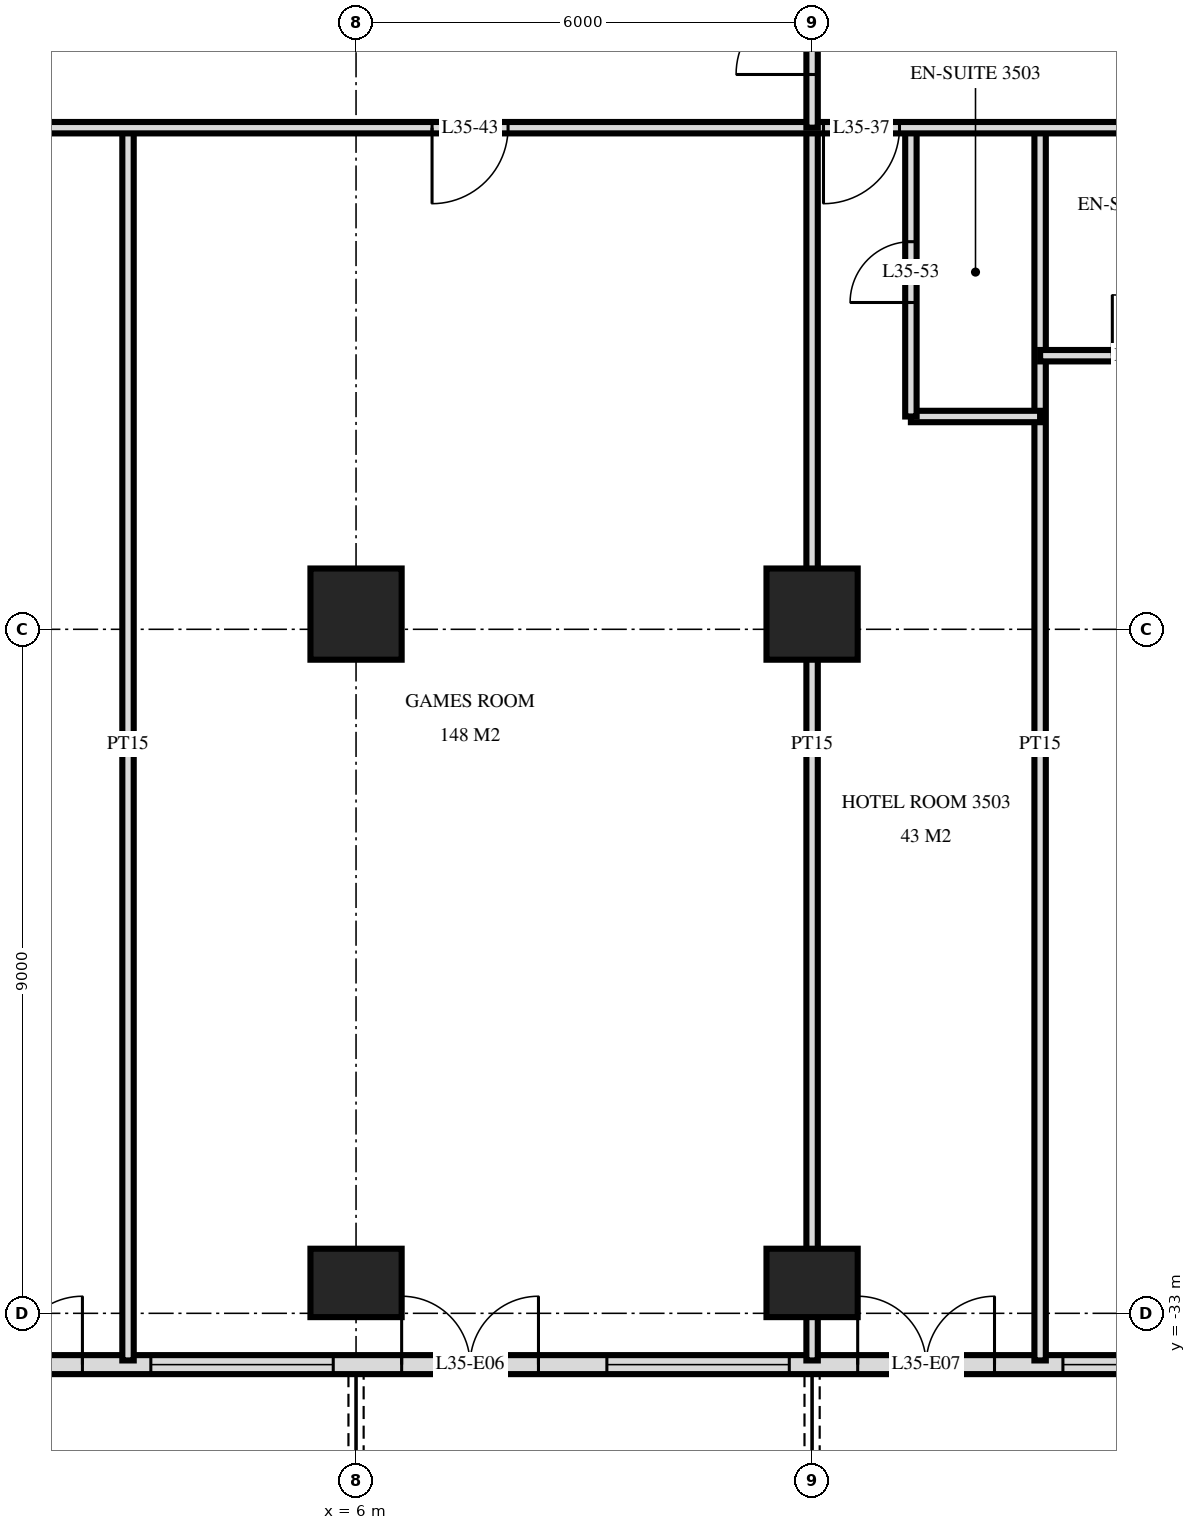
"""IFC4 building model, lengths in metres.
Left out: names, types, materials, properties, quantities, classifications, styles, units other than length and angle.
Written with IfcOpenShell. Run it as: python <this file> out.ifc"""

import sys

from ifc_helpers import new_model, si_unit, direction, frame, frame_2d, origin, origin_2d, place, context, subcontext, project, spatial, rectangle, extrude, element, fill, save


model = new_model("IFC4")
c1 = context("Model", 3, precision=1e-05, world=origin(), true_north=direction((0.0, 1.0)))
c2 = subcontext(c1, "Body", "Model", "MODEL_VIEW")
j1 = project(units=[si_unit("LENGTHUNIT", "METRE"), si_unit("PLANEANGLEUNIT", "RADIAN")], contexts=[c1])
p1 = place(None, origin())
s1 = spatial("IfcSite", under=j1, at=p1, CompositionType="ELEMENT")
p2 = place(p1, origin())
s2 = spatial("IfcBuilding", under=s1, at=p2, CompositionType="ELEMENT")
p3 = place(p2, frame((0.0, 0.0, 138.0)))
s3 = spatial("IfcBuildingStorey", under=s2, at=p3, CompositionType="ELEMENT", Elevation=138.0)
p4 = place(p3, frame((6.0, -32.6, 0.0), z_axis=(0.0, 0.0, 1.0), x_axis=(1.0, 0.0, 0.0)))
e1 = element("IfcColumn", 1, at=p4, inside=s3, PredefinedType="COLUMN", context=c2, shape_type="SweptSolid", body=[
    extrude(rectangle(XDim=1.2, YDim=0.9, at=origin_2d()), origin(), (0.0, 0.0, 1.0), 3.6),
])
p5 = place(p3, frame((6.0, -23.8, 0.0), z_axis=(0.0, 0.0, 1.0), x_axis=(1.0, 0.0, 0.0)))
e2 = element("IfcColumn", 2, at=p5, inside=s3, PredefinedType="COLUMN", context=c2, shape_type="SweptSolid", body=[
    extrude(rectangle(XDim=1.2, YDim=1.2, at=origin_2d()), origin(), (0.0, 0.0, 1.0), 3.6),
])
p6 = place(p3, frame((12.0, -32.6, 0.0), z_axis=(0.0, 0.0, 1.0), x_axis=(1.0, 0.0, 0.0)))
e3 = element("IfcColumn", 3, at=p6, inside=s3, PredefinedType="COLUMN", context=c2, shape_type="SweptSolid", body=[
    extrude(rectangle(XDim=1.2, YDim=0.9, at=origin_2d()), origin(), (0.0, 0.0, 1.0), 3.6),
])
p7 = place(p3, frame((12.0, -23.8, 0.0), z_axis=(0.0, 0.0, 1.0), x_axis=(1.0, 0.0, 0.0)))
e4 = element("IfcColumn", 4, at=p7, inside=s3, PredefinedType="COLUMN", context=c2, shape_type="SweptSolid", body=[
    extrude(rectangle(XDim=1.2, YDim=1.2, at=origin_2d()), origin(), (0.0, 0.0, 1.0), 3.6),
])
p8 = place(p3, frame((-23.675, -33.675, 0.0), z_axis=(0.0, 0.0, 1.0), x_axis=(1.0, 0.0, 0.0)))
e5 = element("IfcWall", 5, at=p8, inside=s3, PredefinedType="SOLIDWALL", context=c2, shape_type="SweptSolid", body=[
    extrude(rectangle(XDim=47.351, YDim=0.25, at=frame_2d((23.675, 0.0))), origin(), (0.0, 0.0, 1.0), 3.32),
])
p9 = place(p8, frame((0.575, 0.0, 0.0)))
e6 = element("IfcOpeningElement", 6, at=p9, cuts=e5, PredefinedType="OPENING", context=c2, shape_type="SweptSolid", body=[
    extrude(rectangle(XDim=1.8, YDim=2.4, at=frame_2d((0.9, 1.2))), frame((0.0, 0.135, 0.0), z_axis=(0.0, -1.0, 0.0), x_axis=(1.0, 0.0, 0.0)), (0.0, 0.0, 1.0), 0.27),
])
p10 = place(p8, frame((3.425, 0.0, 0.3)))
e7 = element("IfcOpeningElement", 7, at=p10, cuts=e5, PredefinedType="OPENING", context=c2, shape_type="SweptSolid", body=[
    extrude(rectangle(XDim=1.8, YDim=2.1, at=frame_2d((0.9, 1.05))), frame((0.0, 0.135, 0.0), z_axis=(0.0, -1.0, 0.0), x_axis=(1.0, 0.0, 0.0)), (0.0, 0.0, 1.0), 0.27),
])
p11 = place(p8, frame((5.975, 0.0, 0.3)))
e8 = element("IfcOpeningElement", 8, at=p11, cuts=e5, PredefinedType="OPENING", context=c2, shape_type="SweptSolid", body=[
    extrude(rectangle(XDim=2.4, YDim=2.1, at=frame_2d((1.2, 1.05))), frame((0.0, 0.135, 0.0), z_axis=(0.0, -1.0, 0.0), x_axis=(1.0, 0.0, 0.0)), (0.0, 0.0, 1.0), 0.27),
])
p12 = place(p8, frame((9.275, 0.0, 0.0)))
e9 = element("IfcOpeningElement", 9, at=p12, cuts=e5, PredefinedType="OPENING", context=c2, shape_type="SweptSolid", body=[
    extrude(rectangle(XDim=1.8, YDim=2.4, at=frame_2d((0.9, 1.2))), frame((0.0, 0.135, 0.0), z_axis=(0.0, -1.0, 0.0), x_axis=(1.0, 0.0, 0.0)), (0.0, 0.0, 1.0), 0.27),
])
p13 = place(p8, frame((12.275, 0.0, 0.0)))
e10 = element("IfcOpeningElement", 10, at=p13, cuts=e5, PredefinedType="OPENING", context=c2, shape_type="SweptSolid", body=[
    extrude(rectangle(XDim=1.8, YDim=2.4, at=frame_2d((0.9, 1.2))), frame((0.0, 0.135, 0.0), z_axis=(0.0, -1.0, 0.0), x_axis=(1.0, 0.0, 0.0)), (0.0, 0.0, 1.0), 0.27),
])
p14 = place(p8, frame((14.975, 0.0, 0.3)))
e11 = element("IfcOpeningElement", 11, at=p14, cuts=e5, PredefinedType="OPENING", context=c2, shape_type="SweptSolid", body=[
    extrude(rectangle(XDim=2.4, YDim=2.1, at=frame_2d((1.2, 1.05))), frame((0.0, 0.135, 0.0), z_axis=(0.0, -1.0, 0.0), x_axis=(1.0, 0.0, 0.0)), (0.0, 0.0, 1.0), 0.27),
])
p15 = place(p8, frame((17.975, 0.0, 0.3)))
e12 = element("IfcOpeningElement", 12, at=p15, cuts=e5, PredefinedType="OPENING", context=c2, shape_type="SweptSolid", body=[
    extrude(rectangle(XDim=2.4, YDim=2.1, at=frame_2d((1.2, 1.05))), frame((0.0, 0.135, 0.0), z_axis=(0.0, -1.0, 0.0), x_axis=(1.0, 0.0, 0.0)), (0.0, 0.0, 1.0), 0.27),
])
p16 = place(p8, frame((21.275, 0.0, 0.0)))
e13 = element("IfcOpeningElement", 13, at=p16, cuts=e5, PredefinedType="OPENING", context=c2, shape_type="SweptSolid", body=[
    extrude(rectangle(XDim=1.8, YDim=2.4, at=frame_2d((0.9, 1.2))), frame((0.0, 0.135, 0.0), z_axis=(0.0, -1.0, 0.0), x_axis=(1.0, 0.0, 0.0)), (0.0, 0.0, 1.0), 0.27),
])
p17 = place(p8, frame((24.275, 0.0, 0.0)))
e14 = element("IfcOpeningElement", 14, at=p17, cuts=e5, PredefinedType="OPENING", context=c2, shape_type="SweptSolid", body=[
    extrude(rectangle(XDim=1.8, YDim=2.4, at=frame_2d((0.9, 1.2))), frame((0.0, 0.135, 0.0), z_axis=(0.0, -1.0, 0.0), x_axis=(1.0, 0.0, 0.0)), (0.0, 0.0, 1.0), 0.27),
])
p18 = place(p8, frame((26.975, 0.0, 0.3)))
e15 = element("IfcOpeningElement", 15, at=p18, cuts=e5, PredefinedType="OPENING", context=c2, shape_type="SweptSolid", body=[
    extrude(rectangle(XDim=2.4, YDim=2.1, at=frame_2d((1.2, 1.05))), frame((0.0, 0.135, 0.0), z_axis=(0.0, -1.0, 0.0), x_axis=(1.0, 0.0, 0.0)), (0.0, 0.0, 1.0), 0.27),
])
p19 = place(p8, frame((30.275, 0.0, 0.0)))
e16 = element("IfcOpeningElement", 16, at=p19, cuts=e5, PredefinedType="OPENING", context=c2, shape_type="SweptSolid", body=[
    extrude(rectangle(XDim=1.8, YDim=2.4, at=frame_2d((0.9, 1.2))), frame((0.0, 0.135, 0.0), z_axis=(0.0, -1.0, 0.0), x_axis=(1.0, 0.0, 0.0)), (0.0, 0.0, 1.0), 0.27),
])
p20 = place(p8, frame((32.975, 0.0, 0.3)))
e17 = element("IfcOpeningElement", 17, at=p20, cuts=e5, PredefinedType="OPENING", context=c2, shape_type="SweptSolid", body=[
    extrude(rectangle(XDim=2.4, YDim=2.1, at=frame_2d((1.2, 1.05))), frame((0.0, 0.135, 0.0), z_axis=(0.0, -1.0, 0.0), x_axis=(1.0, 0.0, 0.0)), (0.0, 0.0, 1.0), 0.27),
])
p21 = place(p8, frame((36.275, 0.0, 0.0)))
e18 = element("IfcOpeningElement", 18, at=p21, cuts=e5, PredefinedType="OPENING", context=c2, shape_type="SweptSolid", body=[
    extrude(rectangle(XDim=1.8, YDim=2.4, at=frame_2d((0.9, 1.2))), frame((0.0, 0.135, 0.0), z_axis=(0.0, -1.0, 0.0), x_axis=(1.0, 0.0, 0.0)), (0.0, 0.0, 1.0), 0.27),
])
p22 = place(p8, frame((38.975, 0.0, 0.3)))
e19 = element("IfcOpeningElement", 19, at=p22, cuts=e5, PredefinedType="OPENING", context=c2, shape_type="SweptSolid", body=[
    extrude(rectangle(XDim=2.4, YDim=2.1, at=frame_2d((1.2, 1.05))), frame((0.0, 0.135, 0.0), z_axis=(0.0, -1.0, 0.0), x_axis=(1.0, 0.0, 0.0)), (0.0, 0.0, 1.0), 0.27),
])
p23 = place(p8, frame((42.275, 0.0, 0.0)))
e20 = element("IfcOpeningElement", 20, at=p23, cuts=e5, PredefinedType="OPENING", context=c2, shape_type="SweptSolid", body=[
    extrude(rectangle(XDim=1.8, YDim=2.4, at=frame_2d((0.9, 1.2))), frame((0.0, 0.135, 0.0), z_axis=(0.0, -1.0, 0.0), x_axis=(1.0, 0.0, 0.0)), (0.0, 0.0, 1.0), 0.27),
])
p24 = place(p8, frame((45.125, 0.0, 0.3)))
e21 = element("IfcOpeningElement", 21, at=p24, cuts=e5, PredefinedType="OPENING", context=c2, shape_type="SweptSolid", body=[
    extrude(rectangle(XDim=1.8, YDim=2.1, at=frame_2d((0.9, 1.05))), frame((0.0, 0.135, 0.0), z_axis=(0.0, -1.0, 0.0), x_axis=(1.0, 0.0, 0.0)), (0.0, 0.0, 1.0), 0.27),
])
p25 = place(p3, frame((15.0, -33.62, 0.0), z_axis=(0.0, 0.0, 1.0), x_axis=(0.0, 1.0, 0.0)))
e22 = element("IfcWall", 22, at=p25, inside=s3, PredefinedType="PARTITIONING", context=c2, shape_type="SweptSolid", body=[
    extrude(rectangle(XDim=16.22, YDim=0.15, at=frame_2d((8.11, 0.0))), origin(), (0.0, 0.0, 1.0), 3.32),
])
p26 = place(p3, frame((13.3, -21.2, 0.0), z_axis=(0.0, 0.0, 1.0), x_axis=(0.0, 1.0, 0.0)))
e23 = element("IfcWall", 23, at=p26, inside=s3, PredefinedType="PARTITIONING", context=c2, shape_type="SweptSolid", body=[
    extrude(rectangle(XDim=3.8, YDim=0.15, at=frame_2d((1.9, 0.0))), origin(), (0.0, 0.0, 1.0), 3.32),
])
p27 = place(p26, frame((1.5, 0.0, 0.0)))
e24 = element("IfcOpeningElement", 24, at=p27, cuts=e23, PredefinedType="OPENING", context=c2, shape_type="SweptSolid", body=[
    extrude(rectangle(XDim=0.8, YDim=2.1, at=frame_2d((0.4, 1.05))), frame((0.0, 0.085, 0.0), z_axis=(0.0, -1.0, 0.0), x_axis=(1.0, 0.0, 0.0)), (0.0, 0.0, 1.0), 0.17),
])
p28 = place(p3, frame((12.0, -17.4, 0.0), z_axis=(0.0, 0.0, 1.0), x_axis=(0.0, 1.0, 0.0)))
e25 = element("IfcWall", 25, at=p28, inside=s3, PredefinedType="PARTITIONING", context=c2, shape_type="SweptSolid", body=[
    extrude(rectangle(XDim=2.35, YDim=0.15, at=frame_2d((1.175, 0.0))), origin(), (0.0, 0.0, 1.0), 3.32),
])
p29 = place(p28, frame((0.7, 0.0, 0.0)))
e26 = element("IfcOpeningElement", 26, at=p29, cuts=e25, PredefinedType="OPENING", context=c2, shape_type="SweptSolid", body=[
    extrude(rectangle(XDim=1.0, YDim=2.1, at=frame_2d((0.5, 1.05))), frame((0.0, 0.085, 0.0), z_axis=(0.0, -1.0, 0.0), x_axis=(1.0, 0.0, 0.0)), (0.0, 0.0, 1.0), 0.17),
])
for number, where, z_axis, x_axis in (
    (27, (12.0, -33.62, 0.0), (0.0, 0.0, 1.0), (0.0, 1.0, 0.0)),
    (28, (3.0, -33.62, 0.0), (0.0, 0.0, 1.0), (0.0, 1.0, 0.0)),
):
    element("IfcWall", number, at=place(p3, frame(where, z_axis=z_axis, x_axis=x_axis)), inside=s3, PredefinedType="PARTITIONING", context=c2, shape_type="SweptSolid", body=[
        extrude(rectangle(XDim=16.22, YDim=0.15, at=frame_2d((8.11, 0.0))), origin(), (0.0, 0.0, 1.0), 3.32),
    ])
p30 = place(p3, frame((13.3, -21.2, 0.0), z_axis=(0.0, 0.0, 1.0), x_axis=(1.0, 0.0, 0.0)))
e29 = element("IfcWall", 29, at=p30, inside=s3, PredefinedType="PARTITIONING", context=c2, shape_type="SweptSolid", body=[
    extrude(rectangle(XDim=1.7, YDim=0.15, at=frame_2d((0.85, 0.0))), origin(), (0.0, 0.0, 1.0), 3.32),
])
p31 = place(p3, frame((15.0, -20.4, 0.0), z_axis=(0.0, 0.0, 1.0), x_axis=(1.0, 0.0, 0.0)))
e30 = element("IfcWall", 30, at=p31, inside=s3, PredefinedType="PARTITIONING", context=c2, shape_type="SweptSolid", body=[
    extrude(rectangle(XDim=4.2, YDim=0.15, at=frame_2d((2.1, 0.0))), origin(), (0.0, 0.0, 1.0), 3.32),
])
p32 = place(p31, frame((0.95, 0.0, 0.0)))
e31 = element("IfcOpeningElement", 31, at=p32, cuts=e30, PredefinedType="OPENING", context=c2, shape_type="SweptSolid", body=[
    extrude(rectangle(XDim=0.8, YDim=2.1, at=frame_2d((0.4, 1.05))), frame((0.0, 0.085, 0.0), z_axis=(0.0, -1.0, 0.0), x_axis=(1.0, 0.0, 0.0)), (0.0, 0.0, 1.0), 0.17),
])
p33 = place(p3, frame((-28.02, -17.4, 0.0), z_axis=(0.0, 0.0, 1.0), x_axis=(1.0, 0.0, 0.0)))
e32 = element("IfcWall", 32, at=p33, inside=s3, PredefinedType="PARTITIONING", context=c2, shape_type="SweptSolid", body=[
    extrude(rectangle(XDim=56.04, YDim=0.15, at=frame_2d((28.02, 0.0))), origin(), (0.0, 0.0, 1.0), 3.32),
])
p34 = place(p33, frame((13.17, 0.0, 0.0)))
e33 = element("IfcOpeningElement", 33, at=p34, cuts=e32, PredefinedType="OPENING", context=c2, shape_type="SweptSolid", body=[
    extrude(rectangle(XDim=1.0, YDim=2.1, at=frame_2d((0.5, 1.05))), frame((0.0, 0.085, 0.0), z_axis=(0.0, -1.0, 0.0), x_axis=(1.0, 0.0, 0.0)), (0.0, 0.0, 1.0), 0.17),
])
p35 = place(p33, frame((11.87, 0.0, 0.0)))
e34 = element("IfcOpeningElement", 34, at=p35, cuts=e32, PredefinedType="OPENING", context=c2, shape_type="SweptSolid", body=[
    extrude(rectangle(XDim=1.0, YDim=2.1, at=frame_2d((0.5, 1.05))), frame((0.0, 0.085, 0.0), z_axis=(0.0, -1.0, 0.0), x_axis=(1.0, 0.0, 0.0)), (0.0, 0.0, 1.0), 0.17),
])
p36 = place(p33, frame((2.32, 0.0, 0.0)))
e35 = element("IfcOpeningElement", 35, at=p36, cuts=e32, PredefinedType="OPENING", context=c2, shape_type="SweptSolid", body=[
    extrude(rectangle(XDim=1.0, YDim=2.1, at=frame_2d((0.5, 1.05))), frame((0.0, 0.085, 0.0), z_axis=(0.0, -1.0, 0.0), x_axis=(1.0, 0.0, 0.0)), (0.0, 0.0, 1.0), 0.17),
])
p37 = place(p33, frame((40.17, 0.0, 0.0)))
e36 = element("IfcOpeningElement", 36, at=p37, cuts=e32, PredefinedType="OPENING", context=c2, shape_type="SweptSolid", body=[
    extrude(rectangle(XDim=1.0, YDim=2.1, at=frame_2d((0.5, 1.05))), frame((0.0, 0.085, 0.0), z_axis=(0.0, -1.0, 0.0), x_axis=(1.0, 0.0, 0.0)), (0.0, 0.0, 1.0), 0.17),
])
p38 = place(p33, frame((51.22, 0.0, 0.0)))
e37 = element("IfcOpeningElement", 37, at=p38, cuts=e32, PredefinedType="OPENING", context=c2, shape_type="SweptSolid", body=[
    extrude(rectangle(XDim=1.0, YDim=2.1, at=frame_2d((0.5, 1.05))), frame((0.0, 0.085, 0.0), z_axis=(0.0, -1.0, 0.0), x_axis=(1.0, 0.0, 0.0)), (0.0, 0.0, 1.0), 0.17),
])
p39 = place(p33, frame((18.52, 0.0, 0.0)))
e38 = element("IfcOpeningElement", 38, at=p39, cuts=e32, PredefinedType="OPENING", context=c2, shape_type="SweptSolid", body=[
    extrude(rectangle(XDim=1.0, YDim=2.1, at=frame_2d((0.5, 1.05))), frame((0.0, 0.085, 0.0), z_axis=(0.0, -1.0, 0.0), x_axis=(1.0, 0.0, 0.0)), (0.0, 0.0, 1.0), 0.17),
])
p40 = place(p33, frame((26.02, 0.0, 0.0)))
e39 = element("IfcOpeningElement", 39, at=p40, cuts=e32, PredefinedType="OPENING", context=c2, shape_type="SweptSolid", body=[
    extrude(rectangle(XDim=1.0, YDim=2.1, at=frame_2d((0.5, 1.05))), frame((0.0, 0.085, 0.0), z_axis=(0.0, -1.0, 0.0), x_axis=(1.0, 0.0, 0.0)), (0.0, 0.0, 1.0), 0.17),
])
p41 = place(p33, frame((35.02, 0.0, 0.0)))
e40 = element("IfcOpeningElement", 40, at=p41, cuts=e32, PredefinedType="OPENING", context=c2, shape_type="SweptSolid", body=[
    extrude(rectangle(XDim=1.0, YDim=2.1, at=frame_2d((0.5, 1.05))), frame((0.0, 0.085, 0.0), z_axis=(0.0, -1.0, 0.0), x_axis=(1.0, 0.0, 0.0)), (0.0, 0.0, 1.0), 0.17),
])
p42 = place(p17, origin())
e41 = element("IfcDoor", 41, at=p42, inside=s3, OperationType="DOUBLE_DOOR_SINGLE_SWING", PredefinedType="DOOR", context=c2, shape_type="SweptSolid", body=[
    extrude(rectangle(XDim=1.8, YDim=2.4, at=frame_2d((0.9, 1.2))), frame((0.0, 0.025, 0.0), z_axis=(0.0, -1.0, 0.0), x_axis=(1.0, 0.0, 0.0)), (0.0, 0.0, 1.0), 0.05),
])
fill(e14, e41)
p43 = place(p18, origin())
e42 = element("IfcWindow", 42, at=p43, inside=s3, PartitioningType="SINGLE_PANEL", PredefinedType="WINDOW", context=c2, shape_type="SweptSolid", body=[
    extrude(rectangle(XDim=2.4, YDim=2.1, at=frame_2d((1.2, 1.05))), frame((0.0, 0.03, 0.0), z_axis=(0.0, -1.0, 0.0), x_axis=(1.0, 0.0, 0.0)), (0.0, 0.0, 1.0), 0.06),
])
fill(e15, e42)
p44 = place(p19, origin())
e43 = element("IfcDoor", 43, at=p44, inside=s3, OperationType="DOUBLE_DOOR_SINGLE_SWING", PredefinedType="DOOR", context=c2, shape_type="SweptSolid", body=[
    extrude(rectangle(XDim=1.8, YDim=2.4, at=frame_2d((0.9, 1.2))), frame((0.0, 0.025, 0.0), z_axis=(0.0, -1.0, 0.0), x_axis=(1.0, 0.0, 0.0)), (0.0, 0.0, 1.0), 0.05),
])
fill(e16, e43)
p45 = place(p20, origin())
e44 = element("IfcWindow", 44, at=p45, inside=s3, PartitioningType="SINGLE_PANEL", PredefinedType="WINDOW", context=c2, shape_type="SweptSolid", body=[
    extrude(rectangle(XDim=2.4, YDim=2.1, at=frame_2d((1.2, 1.05))), frame((0.0, 0.03, 0.0), z_axis=(0.0, -1.0, 0.0), x_axis=(1.0, 0.0, 0.0)), (0.0, 0.0, 1.0), 0.06),
])
fill(e17, e44)
p46 = place(p21, origin())
e45 = element("IfcDoor", 45, at=p46, inside=s3, OperationType="DOUBLE_DOOR_SINGLE_SWING", PredefinedType="DOOR", context=c2, shape_type="SweptSolid", body=[
    extrude(rectangle(XDim=1.8, YDim=2.4, at=frame_2d((0.9, 1.2))), frame((0.0, 0.025, 0.0), z_axis=(0.0, -1.0, 0.0), x_axis=(1.0, 0.0, 0.0)), (0.0, 0.0, 1.0), 0.05),
])
fill(e18, e45)
p47 = place(p22, origin())
e46 = element("IfcWindow", 46, at=p47, inside=s3, PartitioningType="SINGLE_PANEL", PredefinedType="WINDOW", context=c2, shape_type="SweptSolid", body=[
    extrude(rectangle(XDim=2.4, YDim=2.1, at=frame_2d((1.2, 1.05))), frame((0.0, 0.03, 0.0), z_axis=(0.0, -1.0, 0.0), x_axis=(1.0, 0.0, 0.0)), (0.0, 0.0, 1.0), 0.06),
])
fill(e19, e46)
p48 = place(p29, origin())
e47 = element("IfcDoor", 47, at=p48, inside=s3, OperationType="SINGLE_SWING_RIGHT", PredefinedType="DOOR", context=c2, shape_type="SweptSolid", body=[
    extrude(rectangle(XDim=1.0, YDim=2.1, at=frame_2d((0.5, 1.05))), frame((0.0, 0.025, 0.0), z_axis=(0.0, -1.0, 0.0), x_axis=(1.0, 0.0, 0.0)), (0.0, 0.0, 1.0), 0.05),
])
fill(e26, e47)
p49 = place(p37, frame((0.5, 0.0, 0.0), z_axis=(0.0, 0.0, 1.0), x_axis=(-1.0, 0.0, 0.0)))
e48 = element("IfcDoor", 48, at=p49, inside=s3, OperationType="SINGLE_SWING_LEFT", PredefinedType="DOOR", context=c2, shape_type="SweptSolid", body=[
    extrude(rectangle(XDim=1.0, YDim=2.1, at=frame_2d((0.0, 1.05))), frame((0.0, -0.025, 0.0), z_axis=(0.0, 1.0, 0.0), x_axis=(-1.0, 0.0, 0.0)), (0.0, 0.0, 1.0), 0.05),
])
fill(e36, e48)
p50 = place(p41, frame((0.5, 0.0, 0.0), z_axis=(0.0, 0.0, 1.0), x_axis=(-1.0, 0.0, 0.0)))
e49 = element("IfcDoor", 49, at=p50, inside=s3, OperationType="SINGLE_SWING_LEFT", PredefinedType="DOOR", context=c2, shape_type="SweptSolid", body=[
    extrude(rectangle(XDim=1.0, YDim=2.1, at=frame_2d((0.0, 1.05))), frame((0.0, -0.025, 0.0), z_axis=(0.0, 1.0, 0.0), x_axis=(-1.0, 0.0, 0.0)), (0.0, 0.0, 1.0), 0.05),
])
fill(e40, e49)
p51 = place(p27, origin())
e50 = element("IfcDoor", 50, at=p51, inside=s3, OperationType="SINGLE_SWING_RIGHT", PredefinedType="DOOR", context=c2, shape_type="SweptSolid", body=[
    extrude(rectangle(XDim=0.8, YDim=2.1, at=frame_2d((0.4, 1.05))), frame((0.0, 0.025, 0.0), z_axis=(0.0, -1.0, 0.0), x_axis=(1.0, 0.0, 0.0)), (0.0, 0.0, 1.0), 0.05),
])
fill(e24, e50)
p52 = place(p32, origin())
e51 = element("IfcDoor", 51, at=p52, inside=s3, OperationType="SINGLE_SWING_RIGHT", PredefinedType="DOOR", context=c2, shape_type="SweptSolid", body=[
    extrude(rectangle(XDim=0.8, YDim=2.1, at=frame_2d((0.4, 1.05))), frame((0.0, 0.025, 0.0), z_axis=(0.0, -1.0, 0.0), x_axis=(1.0, 0.0, 0.0)), (0.0, 0.0, 1.0), 0.05),
])
fill(e31, e51)
save(model, sys.argv[1])
